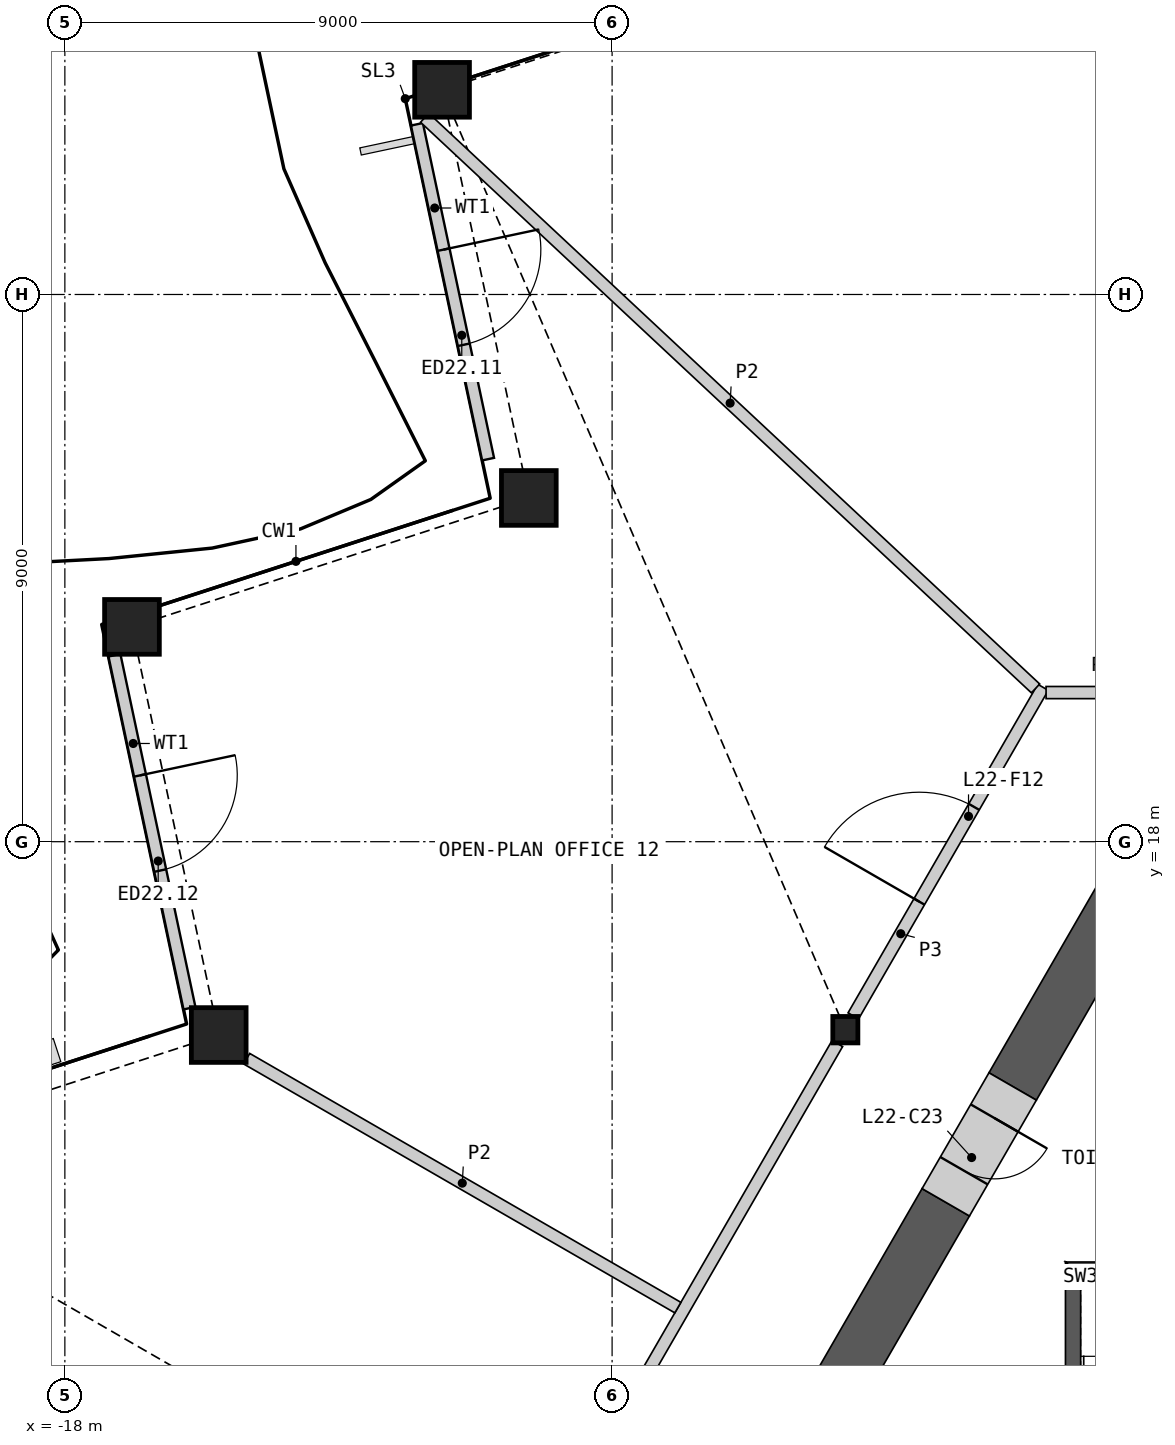
"""IFC4 building model, lengths in metres.
Left out: names, types, materials, properties, quantities, classifications, styles, units other than length and angle.
Written with IfcOpenShell. Run it as: python <this file> out.ifc"""

import sys

from ifc_helpers import new_model, si_unit, direction, frame, frame_2d, origin, origin_2d, place, context, subcontext, project, spatial, polyline, rectangle, hollow_rectangle, i_section, outline, extrude, element, fill, save


model = new_model("IFC4")
c1 = context("Model", 3, precision=1e-05, world=origin(), true_north=direction((0.0, 1.0)))
c2 = subcontext(c1, "Body", "Model", "MODEL_VIEW")
j1 = project(units=[si_unit("LENGTHUNIT", "METRE"), si_unit("PLANEANGLEUNIT", "RADIAN")], contexts=[c1])
p1 = place(None, origin())
s1 = spatial("IfcSite", under=j1, at=p1, CompositionType="ELEMENT")
p2 = place(p1, origin())
s2 = spatial("IfcBuilding", under=s1, at=p2, CompositionType="ELEMENT")
p3 = place(p2, frame((0.0, 0.0, 108.0)))
s3 = spatial("IfcBuildingStorey", under=s2, at=p3, CompositionType="ELEMENT", Elevation=108.0)
for number, where, z_axis, x_axis in (
    (1, (-11.796, 30.366, 0.0), (0.0, 0.0, 1.0), (1.0, 0.0, 0.0)),
    (2, (-10.37, 23.654, 0.0), (0.0, 0.0, 1.0), (1.0, 0.0, 0.0)),
    (3, (-16.896, 21.533, 0.0), (0.0, 0.0, 1.0), (1.0, 0.0, 0.0)),
    (4, (-15.469, 14.82, 0.0), (0.0, 0.0, 1.0), (1.0, 0.0, 0.0)),
):
    element("IfcColumn", number, at=place(p3, frame(where, z_axis=z_axis, x_axis=x_axis)), inside=s3, PredefinedType="COLUMN", context=c2, shape_type="SweptSolid", body=[
        extrude(hollow_rectangle(XDim=0.9, YDim=0.9, WallThickness=0.06, at=origin_2d()), origin(), (0.0, 0.0, 1.0), 4.2),
    ])
p4 = place(p3, frame((-5.164, 14.908, 0.0), z_axis=(0.0, 0.0, 1.0), x_axis=(1.0, 0.0, 0.0)))
e5 = element("IfcColumn", 5, at=p4, inside=s3, PredefinedType="COLUMN", context=c2, shape_type="SweptSolid", body=[
    extrude(i_section(OverallWidth=0.412, OverallDepth=0.435, WebThickness=0.036, FlangeThickness=0.057, at=origin_2d()), origin(), (0.0, 0.0, 1.0), 4.2),
])
p5 = place(p3, frame((-12.21, 29.799, 0.0), z_axis=(0.0, 0.0, 1.0), x_axis=(0.207917875772, -0.978146286061, 0.0)))
e6 = element("IfcWall", 6, at=p5, inside=s3, PredefinedType="SOLIDWALL", context=c2, shape_type="SweptSolid", body=[
    extrude(rectangle(XDim=5.63, YDim=0.2, at=frame_2d((2.815, 0.0))), origin(), (0.0, 0.0, 1.0), 3.189),
])
p6 = place(p5, frame((2.107, 0.0, 0.0)))
e7 = element("IfcOpeningElement", 7, at=p6, cuts=e6, PredefinedType="OPENING", context=c2, shape_type="SweptSolid", body=[
    extrude(rectangle(XDim=1.6, YDim=2.4, at=frame_2d((0.8, 1.2))), frame((0.0, 0.11, 0.0), z_axis=(0.0, -1.0, 0.0), x_axis=(1.0, 0.0, 0.0)), (0.0, 0.0, 1.0), 0.22),
])
p7 = place(p3, frame((-17.185, 21.066, 0.0), z_axis=(0.0, 0.0, 1.0), x_axis=(0.207930102794, -0.978143686966, 0.0)))
e8 = element("IfcWall", 8, at=p7, inside=s3, PredefinedType="SOLIDWALL", context=c2, shape_type="SweptSolid", body=[
    extrude(rectangle(XDim=5.934, YDim=0.2, at=frame_2d((2.967, 0.0))), origin(), (0.0, 0.0, 1.0), 3.189),
])
p8 = place(p7, frame((2.02, 0.0, 0.0)))
e9 = element("IfcOpeningElement", 9, at=p8, cuts=e8, PredefinedType="OPENING", context=c2, shape_type="SweptSolid", body=[
    extrude(rectangle(XDim=1.6, YDim=2.4, at=frame_2d((0.8, 1.2))), frame((0.0, 0.11, 0.0), z_axis=(0.0, -1.0, 0.0), x_axis=(1.0, 0.0, 0.0)), (0.0, 0.0, 1.0), 0.22),
])
p9 = place(p3, origin())
e10 = element("IfcWall", 10, at=p9, inside=s3, PredefinedType="SHEAR", context=c2, shape_type="SweptSolid", body=[
    extrude(outline(polyline([(1.544, 11.087), (-1.544, 11.087), (-1.294, 10.837), (1.294, 10.837), (1.544, 11.087)])), origin(), (0.0, 0.0, 1.0), 3.8),
])
p10 = place(p3, origin())
e11 = element("IfcWall", 11, at=p10, inside=s3, PredefinedType="SHEAR", context=c2, shape_type="SweptSolid", body=[
    extrude(outline(polyline([(-1.294, 10.837), (-1.544, 11.087), (-1.544, 5.237), (-1.294, 5.237), (-1.294, 10.837)])), origin(), (0.0, 0.0, 1.0), 3.8),
])
p11 = place(p3, frame((-3.512, 12.069, 0.0), z_axis=(0.0, 0.0, 1.0), x_axis=(-0.500002126466, -0.866024176065, 0.0)))
e12 = element("IfcWall", 12, at=p11, inside=s3, PredefinedType="SHEAR", context=c2, shape_type="SweptSolid", body=[
    extrude(rectangle(XDim=8.816, YDim=0.9, at=frame_2d((4.408, 0.0))), origin(), (0.0, 0.0, 1.0), 3.8),
])
p12 = place(p3, frame((-0.39, 17.478, 0.0), z_axis=(0.0, 0.0, 1.0), x_axis=(-0.500046330384, -0.865998653272, 0.0)))
e13 = element("IfcWall", 13, at=p12, inside=s3, PredefinedType="SHEAR", context=c2, shape_type="SweptSolid", body=[
    extrude(rectangle(XDim=4.045, YDim=0.9, at=frame_2d((2.023, 0.0))), origin(), (0.0, 0.0, 1.0), 3.8),
])
p13 = place(p3, frame((-2.413, 13.974, 0.0), z_axis=(0.0, 0.0, 1.0), x_axis=(-0.499946605688, -0.86605622881, 0.0)))
e14 = element("IfcWall", 14, at=p13, inside=s3, PredefinedType="SHEAR", context=c2, shape_type="SweptSolid", body=[
    extrude(rectangle(XDim=2.2, YDim=0.9, at=frame_2d((1.1, 0.0))), origin(), (0.0, 0.0, 1.0), 3.8),
])
p14 = place(p13, frame((0.6, 0.0, 0.0)))
e15 = element("IfcOpeningElement", 15, at=p14, cuts=e14, PredefinedType="OPENING", context=c2, shape_type="SweptSolid", body=[
    extrude(rectangle(XDim=1.0, YDim=2.1, at=frame_2d((0.5, 1.05))), frame((0.0, 0.46, 0.0), z_axis=(0.0, -1.0, 0.0), x_axis=(1.0, 0.0, 0.0)), (0.0, 0.0, 1.0), 0.92),
])
p15 = place(p3, frame((-10.197, 6.19, 0.0), z_axis=(0.0, 0.0, 1.0), x_axis=(0.500012035596, 0.866018454918, 0.0)))
e16 = element("IfcWall", 16, at=p15, inside=s3, PredefinedType="PARTITIONING", context=c2, shape_type="SweptSolid", body=[
    extrude(rectangle(XDim=9.803, YDim=0.2, at=frame_2d((4.902, 0.0))), origin(), (0.0, 0.0, 1.0), 3.8),
])
p16 = place(p3, frame((-5.033, 15.135, 0.0), z_axis=(0.0, 0.0, 1.0), x_axis=(0.499980978912, 0.866036385336, 0.0)))
e17 = element("IfcWall", 17, at=p16, inside=s3, PredefinedType="PARTITIONING", context=c2, shape_type="SweptSolid", body=[
    extrude(rectangle(XDim=6.24, YDim=0.2, at=frame_2d((3.12, 0.0))), origin(), (0.0, 0.0, 1.0), 3.8),
])
p17 = place(p16, frame((2.169, 0.0, 0.0)))
e18 = element("IfcOpeningElement", 18, at=p17, cuts=e17, PredefinedType="OPENING", context=c2, shape_type="SweptSolid", body=[
    extrude(rectangle(XDim=1.8, YDim=2.1, at=frame_2d((0.9, 1.05))), frame((0.0, 0.11, 0.0), z_axis=(0.0, -1.0, 0.0), x_axis=(1.0, 0.0, 0.0)), (0.0, 0.0, 1.0), 0.22),
])
p18 = place(p3, frame((-1.863, 20.453, 0.0), z_axis=(0.0, 0.0, 1.0), x_axis=(1.0, 0.0, 0.0)))
e19 = element("IfcWall", 19, at=p18, inside=s3, PredefinedType="PARTITIONING", context=c2, shape_type="SweptSolid", body=[
    extrude(rectangle(XDim=3.726, YDim=0.2, at=frame_2d((1.863, 0.0))), origin(), (0.0, 0.0, 1.0), 3.8),
])
p19 = place(p18, frame((1.363, 0.0, 0.0)))
e20 = element("IfcOpeningElement", 20, at=p19, cuts=e19, PredefinedType="OPENING", context=c2, shape_type="SweptSolid", body=[
    extrude(rectangle(XDim=1.0, YDim=2.1, at=frame_2d((0.5, 1.05))), frame((0.0, 0.11, 0.0), z_axis=(0.0, -1.0, 0.0), x_axis=(1.0, 0.0, 0.0)), (0.0, 0.0, 1.0), 0.22),
])
p20 = place(p3, frame((-12.082, 29.906, 0.0), z_axis=(0.0, 0.0, 1.0), x_axis=(0.730716801277, -0.682680713315, 0.0)))
e21 = element("IfcWall", 21, at=p20, inside=s3, PredefinedType="PARTITIONING", context=c2, shape_type="SweptSolid", body=[
    extrude(rectangle(XDim=13.748, YDim=0.2, at=frame_2d((6.874, 0.0))), origin(), (0.0, 0.0, 1.0), 2.885),
])
p21 = place(p3, frame((-15.01, 14.431, 0.0), z_axis=(0.0, 0.0, 1.0), x_axis=(0.866019738461, -0.5000098125, 0.0)))
e22 = element("IfcWall", 22, at=p21, inside=s3, PredefinedType="PARTITIONING", context=c2, shape_type="SweptSolid", body=[
    extrude(rectangle(XDim=8.188, YDim=0.2, at=frame_2d((4.094, 0.0))), origin(), (0.0, 0.0, 1.0), 2.885),
])
p22 = place(p6, origin())
e23 = element("IfcDoor", 23, at=p22, inside=s3, OperationType="DOUBLE_DOOR_SINGLE_SWING", PredefinedType="DOOR", context=c2, shape_type="SweptSolid", body=[
    extrude(rectangle(XDim=1.6, YDim=2.4, at=frame_2d((0.8, 1.2))), frame((0.0, 0.025, 0.0), z_axis=(0.0, -1.0, 0.0), x_axis=(1.0, 0.0, 0.0)), (0.0, 0.0, 1.0), 0.05),
])
fill(e7, e23)
p23 = place(p8, origin())
e24 = element("IfcDoor", 24, at=p23, inside=s3, OperationType="DOUBLE_DOOR_SINGLE_SWING", PredefinedType="DOOR", context=c2, shape_type="SweptSolid", body=[
    extrude(rectangle(XDim=1.6, YDim=2.4, at=frame_2d((0.8, 1.2))), frame((0.0, 0.025, 0.0), z_axis=(0.0, -1.0, 0.0), x_axis=(1.0, 0.0, 0.0)), (0.0, 0.0, 1.0), 0.05),
])
fill(e9, e24)
p24 = place(p14, origin())
e25 = element("IfcDoor", 25, at=p24, inside=s3, OperationType="SINGLE_SWING_LEFT", PredefinedType="DOOR", context=c2, shape_type="SweptSolid", body=[
    extrude(rectangle(XDim=1.0, YDim=2.1, at=frame_2d((0.5, 1.05))), frame((0.0, 0.205, 0.0), z_axis=(0.0, -1.0, 0.0), x_axis=(1.0, 0.0, 0.0)), (0.0, 0.0, 1.0), 0.05),
])
fill(e15, e25)
p25 = place(p17, origin())
e26 = element("IfcDoor", 26, at=p25, inside=s3, OperationType="DOUBLE_DOOR_SINGLE_SWING", PredefinedType="DOOR", context=c2, shape_type="SweptSolid", body=[
    extrude(rectangle(XDim=1.8, YDim=2.1, at=frame_2d((0.9, 1.05))), frame((0.0, 0.025, 0.0), z_axis=(0.0, -1.0, 0.0), x_axis=(1.0, 0.0, 0.0)), (0.0, 0.0, 1.0), 0.05),
])
fill(e18, e26)
save(model, sys.argv[1])
